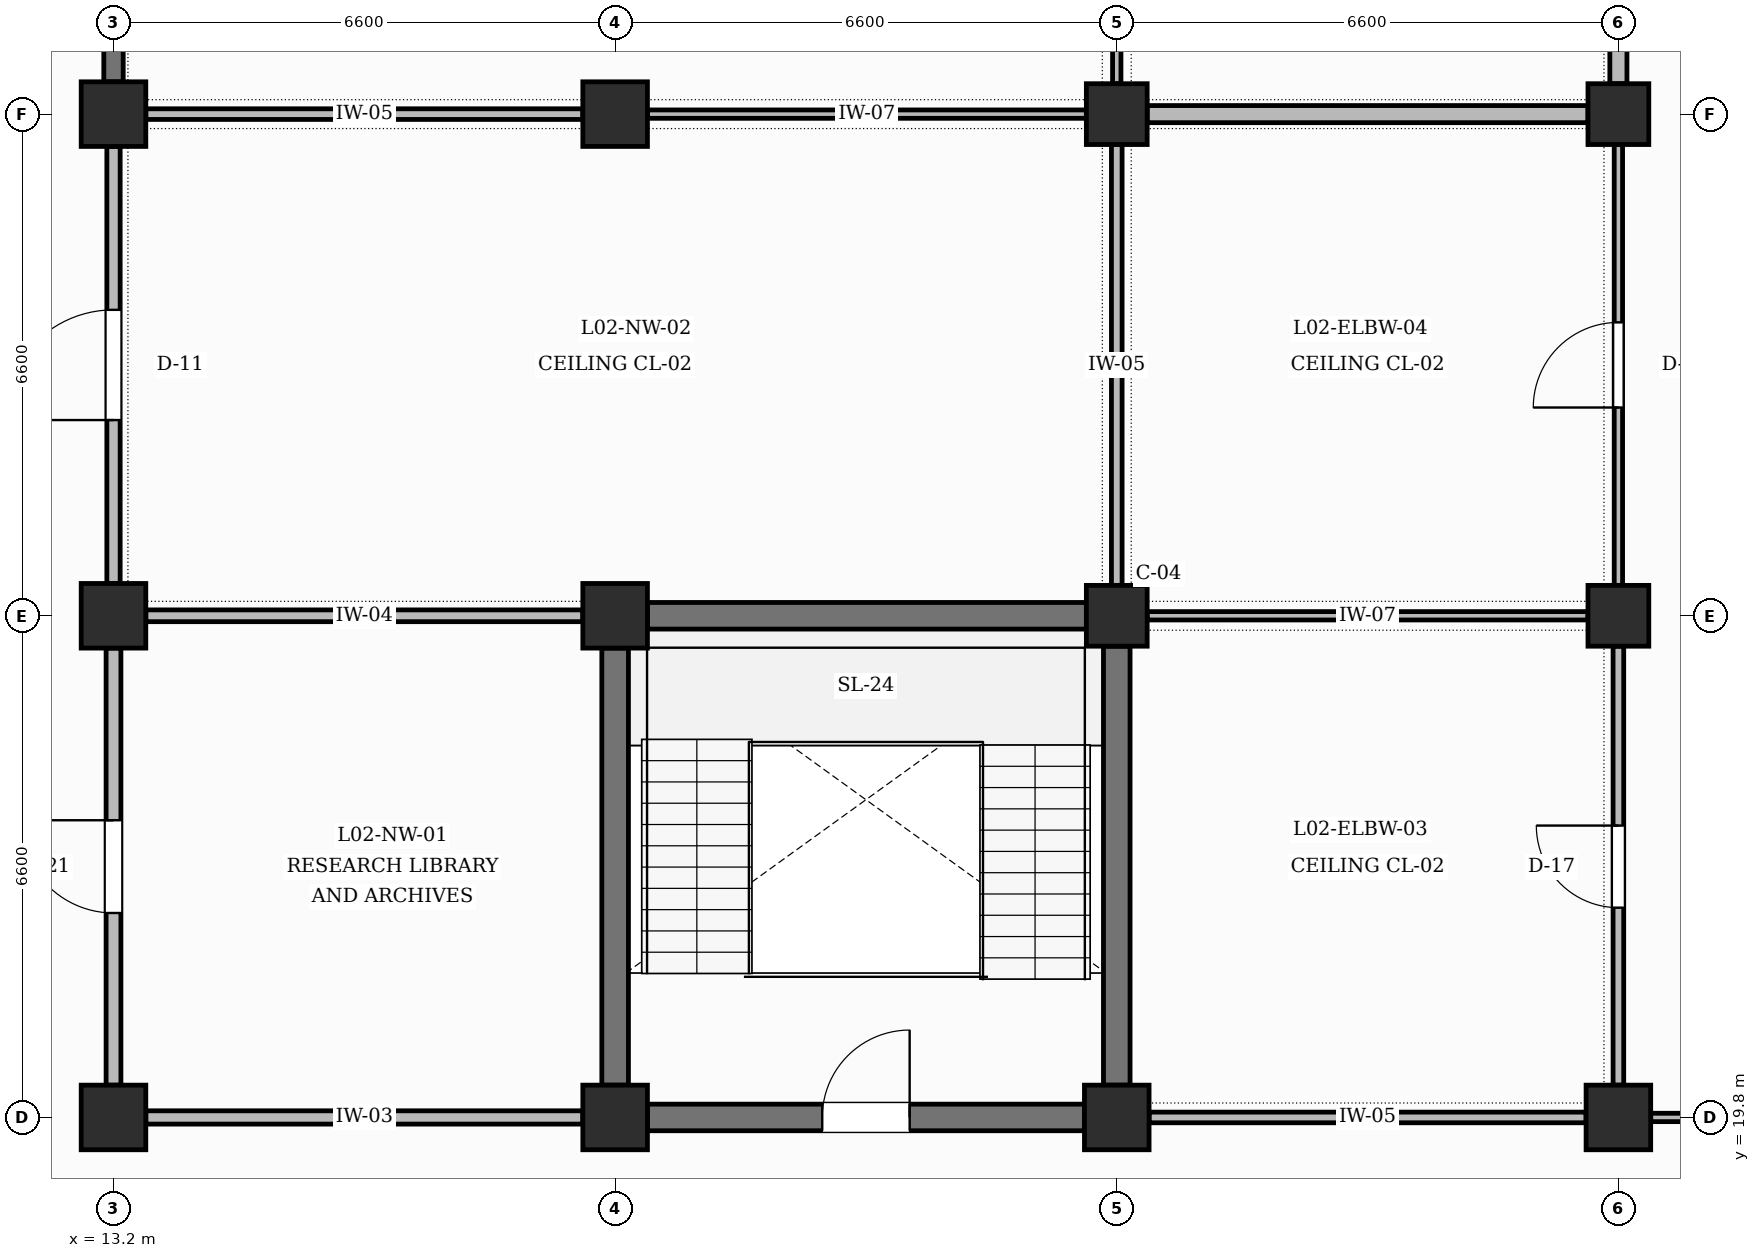
"""IFC4 building model, lengths in metres.
Left out: names, types, materials, properties, quantities, classifications, styles, units other than length and angle.
Written with IfcOpenShell. Run it as: python <this file> out.ifc"""

import sys

from ifc_helpers import new_model, si_unit, direction, frame, frame_2d, origin, origin_2d, place, context, subcontext, project, spatial, rectangle, extrude, element, fill, save


model = new_model("IFC4")
c1 = context("Model", 3, precision=1e-05, world=origin(), true_north=direction((0.0, 1.0)))
c2 = subcontext(c1, "Body", "Model", "MODEL_VIEW")
j1 = project(units=[si_unit("LENGTHUNIT", "METRE"), si_unit("PLANEANGLEUNIT", "RADIAN")], contexts=[c1])
p1 = place(None, origin())
s1 = spatial("IfcSite", under=j1, at=p1, CompositionType="ELEMENT")
p2 = place(p1, origin())
s2 = spatial("IfcBuilding", under=s1, at=p2, CompositionType="ELEMENT")
p3 = place(p2, frame((0.0, 0.0, 10.2)))
s3 = spatial("IfcBuildingStorey", under=s2, at=p3, CompositionType="ELEMENT", Elevation=10.2)
for number, where, z_axis, x_axis in (
    (1, (13.2, 19.8, 0.0), (0.0, 0.0, 1.0), (1.0, 0.0, 0.0)),
    (2, (13.2, 26.4, 0.0), (0.0, 0.0, 1.0), (1.0, 0.0, 0.0)),
    (3, (13.2, 33.0, 0.0), (0.0, 0.0, 1.0), (1.0, 0.0, 0.0)),
    (4, (19.8, 19.8, 0.0), (0.0, 0.0, 1.0), (1.0, 0.0, 0.0)),
    (5, (19.8, 26.4, 0.0), (0.0, 0.0, 1.0), (1.0, 0.0, 0.0)),
    (6, (19.8, 33.0, 0.0), (0.0, 0.0, 1.0), (1.0, 0.0, 0.0)),
    (7, (26.4, 19.8, 0.0), (0.0, 0.0, 1.0), (1.0, 0.0, 0.0)),
):
    element("IfcColumn", number, at=place(p3, frame(where, z_axis=z_axis, x_axis=x_axis)), inside=s3, PredefinedType="COLUMN", context=c2, shape_type="SweptSolid", body=[
        extrude(rectangle(XDim=0.85, YDim=0.85, at=origin_2d()), origin(), (0.0, 0.0, 1.0), 4.2),
    ])
for number, where, z_axis, x_axis in (
    (8, (26.4, 26.4, 0.0), (0.0, 0.0, 1.0), (1.0, 0.0, 0.0)),
    (9, (26.4, 33.0, 0.0), (0.0, 0.0, 1.0), (1.0, 0.0, 0.0)),
):
    element("IfcColumn", number, at=place(p3, frame(where, z_axis=z_axis, x_axis=x_axis)), inside=s3, PredefinedType="COLUMN", context=c2, shape_type="SweptSolid", body=[
        extrude(rectangle(XDim=0.8, YDim=0.8, at=origin_2d()), origin(), (0.0, 0.0, 1.0), 4.2),
    ])
p4 = place(p3, frame((33.0, 19.8, 0.0), z_axis=(0.0, 0.0, 1.0), x_axis=(1.0, 0.0, 0.0)))
e10 = element("IfcColumn", 10, at=p4, inside=s3, PredefinedType="COLUMN", context=c2, shape_type="SweptSolid", body=[
    extrude(rectangle(XDim=0.85, YDim=0.85, at=origin_2d()), origin(), (0.0, 0.0, 1.0), 4.2),
])
for number, where, z_axis, x_axis in (
    (11, (33.0, 26.4, 0.0), (0.0, 0.0, 1.0), (1.0, 0.0, 0.0)),
    (12, (33.0, 33.0, 0.0), (0.0, 0.0, 1.0), (1.0, 0.0, 0.0)),
):
    element("IfcColumn", number, at=place(p3, frame(where, z_axis=z_axis, x_axis=x_axis)), inside=s3, PredefinedType="COLUMN", context=c2, shape_type="SweptSolid", body=[
        extrude(rectangle(XDim=0.8, YDim=0.8, at=origin_2d()), origin(), (0.0, 0.0, 1.0), 4.2),
    ])
p5 = place(p3, frame((20.225, 19.8, 0.0), z_axis=(0.0, 0.0, 1.0), x_axis=(1.0, 0.0, 0.0)))
e13 = element("IfcWall", 13, at=p5, inside=s3, PredefinedType="SHEAR", context=c2, shape_type="SweptSolid", body=[
    extrude(rectangle(XDim=5.75, YDim=0.35, at=frame_2d((2.875, 0.0))), origin(), (0.0, 0.0, 1.0), 3.0),
])
p6 = place(p5, frame((2.3, 0.0, 0.0)))
e14 = element("IfcOpeningElement", 14, at=p6, cuts=e13, PredefinedType="OPENING", context=c2, shape_type="SweptSolid", body=[
    extrude(rectangle(XDim=1.15, YDim=2.2, at=frame_2d((0.575, 1.1))), frame((0.0, 0.185, 0.0), z_axis=(0.0, -1.0, 0.0), x_axis=(1.0, 0.0, 0.0)), (0.0, 0.0, 1.0), 0.37),
])
p7 = place(p3, frame((20.225, 26.4, 0.0), z_axis=(0.0, 0.0, 1.0), x_axis=(1.0, 0.0, 0.0)))
e15 = element("IfcWall", 15, at=p7, inside=s3, PredefinedType="SHEAR", context=c2, shape_type="SweptSolid", body=[
    extrude(rectangle(XDim=5.775, YDim=0.35, at=frame_2d((2.887, 0.0))), origin(), (0.0, 0.0, 1.0), 3.1),
])
p8 = place(p3, frame((19.8, 20.225, 0.0), z_axis=(0.0, 0.0, 1.0), x_axis=(0.0, 1.0, 0.0)))
e16 = element("IfcWall", 16, at=p8, inside=s3, PredefinedType="SHEAR", context=c2, shape_type="SweptSolid", body=[
    extrude(rectangle(XDim=5.75, YDim=0.35, at=frame_2d((2.875, 0.0))), origin(), (0.0, 0.0, 1.0), 3.1),
])
p9 = place(p3, frame((26.4, 20.225, 0.0), z_axis=(0.0, 0.0, 1.0), x_axis=(0.0, 1.0, 0.0)))
e17 = element("IfcWall", 17, at=p9, inside=s3, PredefinedType="SHEAR", context=c2, shape_type="SweptSolid", body=[
    extrude(rectangle(XDim=5.775, YDim=0.35, at=frame_2d((2.887, 0.0))), origin(), (0.0, 0.0, 1.0), 3.1),
])
p10 = place(p3, frame((13.2, 20.225, 0.0), z_axis=(0.0, 0.0, 1.0), x_axis=(0.0, 1.0, 0.0)))
e18 = element("IfcWall", 18, at=p10, inside=s3, PredefinedType="PARTITIONING", context=c2, shape_type="SweptSolid", body=[
    extrude(rectangle(XDim=5.75, YDim=0.195, at=frame_2d((2.875, 0.0))), origin(), (0.0, 0.0, 1.0), 3.1),
])
p11 = place(p10, frame((2.265, 0.0, 0.0)))
e19 = element("IfcOpeningElement", 19, at=p11, cuts=e18, PredefinedType="OPENING", context=c2, shape_type="SweptSolid", body=[
    extrude(rectangle(XDim=1.22, YDim=2.15, at=frame_2d((0.61, 1.075))), frame((0.0, 0.107, 0.0), z_axis=(0.0, -1.0, 0.0), x_axis=(1.0, 0.0, 0.0)), (0.0, 0.0, 1.0), 0.215),
])
p12 = place(p3, frame((13.2, 26.825, 0.0), z_axis=(0.0, 0.0, 1.0), x_axis=(0.0, 1.0, 0.0)))
e20 = element("IfcWall", 20, at=p12, inside=s3, PredefinedType="PARTITIONING", context=c2, shape_type="SweptSolid", body=[
    extrude(rectangle(XDim=5.75, YDim=0.175, at=frame_2d((2.875, 0.0))), origin(), (0.0, 0.0, 1.0), 3.1),
])
p13 = place(p12, frame((2.15, 0.0, 0.0)))
e21 = element("IfcOpeningElement", 21, at=p13, cuts=e20, PredefinedType="OPENING", context=c2, shape_type="SweptSolid", body=[
    extrude(rectangle(XDim=1.45, YDim=2.25, at=frame_2d((0.725, 1.125))), frame((0.0, 0.097, 0.0), z_axis=(0.0, -1.0, 0.0), x_axis=(1.0, 0.0, 0.0)), (0.0, 0.0, 1.0), 0.195),
])
p14 = place(p3, frame((13.2, 33.425, 0.0), z_axis=(0.0, 0.0, 1.0), x_axis=(0.0, 1.0, 0.0)))
e22 = element("IfcWall", 22, at=p14, inside=s3, PredefinedType="SHEAR", context=c2, shape_type="SweptSolid", body=[
    extrude(rectangle(XDim=5.75, YDim=0.255, at=frame_2d((2.875, 0.0))), origin(), (0.0, 0.0, 1.0), 3.1),
])
p15 = place(p14, frame((2.335, 0.0, 0.0)))
e23 = element("IfcOpeningElement", 23, at=p15, cuts=e22, PredefinedType="OPENING", context=c2, shape_type="SweptSolid", body=[
    extrude(rectangle(XDim=1.08, YDim=2.15, at=frame_2d((0.54, 1.075))), frame((0.0, 0.137, 0.0), z_axis=(0.0, -1.0, 0.0), x_axis=(1.0, 0.0, 0.0)), (0.0, 0.0, 1.0), 0.275),
])
p16 = place(p3, frame((13.625, 19.8, 0.0), z_axis=(0.0, 0.0, 1.0), x_axis=(1.0, 0.0, 0.0)))
e24 = element("IfcWall", 24, at=p16, inside=s3, PredefinedType="PARTITIONING", context=c2, shape_type="SweptSolid", body=[
    extrude(rectangle(XDim=5.75, YDim=0.175, at=frame_2d((2.875, 0.0))), origin(), (0.0, 0.0, 1.0), 3.1),
])
p17 = place(p3, frame((13.625, 26.4, 0.0), z_axis=(0.0, 0.0, 1.0), x_axis=(1.0, 0.0, 0.0)))
e25 = element("IfcWall", 25, at=p17, inside=s3, PredefinedType="PARTITIONING", context=c2, shape_type="SweptSolid", body=[
    extrude(rectangle(XDim=5.75, YDim=0.155, at=frame_2d((2.875, 0.0))), origin(), (0.0, 0.0, 1.0), 3.0),
])
p18 = place(p3, frame((13.625, 33.0, 0.0), z_axis=(0.0, 0.0, 1.0), x_axis=(1.0, 0.0, 0.0)))
e26 = element("IfcWall", 26, at=p18, inside=s3, PredefinedType="PARTITIONING", context=c2, shape_type="SweptSolid", body=[
    extrude(rectangle(XDim=5.75, YDim=0.14, at=frame_2d((2.875, 0.0))), origin(), (0.0, 0.0, 1.0), 3.1),
])
p19 = place(p3, frame((26.4, 26.8, 0.0), z_axis=(0.0, 0.0, 1.0), x_axis=(0.0, 1.0, 0.0)))
e27 = element("IfcWall", 27, at=p19, inside=s3, PredefinedType="PARTITIONING", context=c2, shape_type="SweptSolid", body=[
    extrude(rectangle(XDim=5.8, YDim=0.14, at=frame_2d((2.9, 0.0))), origin(), (0.0, 0.0, 1.0), 3.1),
])
p20 = place(p3, frame((20.225, 33.0, 0.0), z_axis=(0.0, 0.0, 1.0), x_axis=(1.0, 0.0, 0.0)))
e28 = element("IfcWall", 28, at=p20, inside=s3, PredefinedType="PARTITIONING", context=c2, shape_type="SweptSolid", body=[
    extrude(rectangle(XDim=5.775, YDim=0.11, at=frame_2d((2.887, 0.0))), origin(), (0.0, 0.0, 1.0), 3.0),
])
p21 = place(p3, frame((26.4, 33.4, 0.0), z_axis=(0.0, 0.0, 1.0), x_axis=(0.0, 1.0, 0.0)))
e29 = element("IfcWall", 29, at=p21, inside=s3, PredefinedType="PARTITIONING", context=c2, shape_type="SweptSolid", body=[
    extrude(rectangle(XDim=5.8, YDim=0.11, at=frame_2d((2.9, 0.0))), origin(), (0.0, 0.0, 1.0), 3.1),
])
p22 = place(p3, frame((26.825, 19.8, 0.0), z_axis=(0.0, 0.0, 1.0), x_axis=(1.0, 0.0, 0.0)))
e30 = element("IfcWall", 30, at=p22, inside=s3, PredefinedType="PARTITIONING", context=c2, shape_type="SweptSolid", body=[
    extrude(rectangle(XDim=5.75, YDim=0.14, at=frame_2d((2.875, 0.0))), origin(), (0.0, 0.0, 1.0), 3.1),
])
p23 = place(p3, frame((33.0, 20.225, 0.0), z_axis=(0.0, 0.0, 1.0), x_axis=(0.0, 1.0, 0.0)))
e31 = element("IfcWall", 31, at=p23, inside=s3, PredefinedType="PARTITIONING", context=c2, shape_type="SweptSolid", body=[
    extrude(rectangle(XDim=5.775, YDim=0.14, at=frame_2d((2.887, 0.0))), origin(), (0.0, 0.0, 1.0), 3.1),
])
p24 = place(p23, frame((2.335, 0.0, 0.0)))
e32 = element("IfcOpeningElement", 32, at=p24, cuts=e31, PredefinedType="OPENING", context=c2, shape_type="SweptSolid", body=[
    extrude(rectangle(XDim=1.08, YDim=2.15, at=frame_2d((0.54, 1.075))), frame((0.0, 0.08, 0.0), z_axis=(0.0, -1.0, 0.0), x_axis=(1.0, 0.0, 0.0)), (0.0, 0.0, 1.0), 0.16),
])
p25 = place(p3, frame((26.8, 26.4, 0.0), z_axis=(0.0, 0.0, 1.0), x_axis=(1.0, 0.0, 0.0)))
e33 = element("IfcWall", 33, at=p25, inside=s3, PredefinedType="PARTITIONING", context=c2, shape_type="SweptSolid", body=[
    extrude(rectangle(XDim=5.8, YDim=0.11, at=frame_2d((2.9, 0.0))), origin(), (0.0, 0.0, 1.0), 3.0),
])
p26 = place(p3, frame((33.0, 26.8, 0.0), z_axis=(0.0, 0.0, 1.0), x_axis=(0.0, 1.0, 0.0)))
e34 = element("IfcWall", 34, at=p26, inside=s3, PredefinedType="PARTITIONING", context=c2, shape_type="SweptSolid", body=[
    extrude(rectangle(XDim=5.8, YDim=0.11, at=frame_2d((2.9, 0.0))), origin(), (0.0, 0.0, 1.0), 3.1),
])
p27 = place(p26, frame((2.34, 0.0, 0.0)))
e35 = element("IfcOpeningElement", 35, at=p27, cuts=e34, PredefinedType="OPENING", context=c2, shape_type="SweptSolid", body=[
    extrude(rectangle(XDim=1.12, YDim=2.2, at=frame_2d((0.56, 1.1))), frame((0.0, 0.065, 0.0), z_axis=(0.0, -1.0, 0.0), x_axis=(1.0, 0.0, 0.0)), (0.0, 0.0, 1.0), 0.13),
])
p28 = place(p3, frame((26.8, 33.0, 0.0), z_axis=(0.0, 0.0, 1.0), x_axis=(1.0, 0.0, 0.0)))
e36 = element("IfcWall", 36, at=p28, inside=s3, PredefinedType="PARTITIONING", context=c2, shape_type="SweptSolid", body=[
    extrude(rectangle(XDim=5.8, YDim=0.225, at=frame_2d((2.9, 0.0))), origin(), (0.0, 0.0, 1.0), 3.1),
])
p29 = place(p3, frame((33.0, 33.4, 0.0), z_axis=(0.0, 0.0, 1.0), x_axis=(0.0, 1.0, 0.0)))
e37 = element("IfcWall", 37, at=p29, inside=s3, PredefinedType="PARTITIONING", context=c2, shape_type="SweptSolid", body=[
    extrude(rectangle(XDim=5.8, YDim=0.225, at=frame_2d((2.9, 0.0))), origin(), (0.0, 0.0, 1.0), 3.1),
])
p30 = place(p29, frame((2.31, 0.0, 0.0)))
e38 = element("IfcOpeningElement", 38, at=p30, cuts=e37, PredefinedType="OPENING", context=c2, shape_type="SweptSolid", body=[
    extrude(rectangle(XDim=1.18, YDim=2.2, at=frame_2d((0.59, 1.1))), frame((0.0, 0.123, 0.0), z_axis=(0.0, -1.0, 0.0), x_axis=(1.0, 0.0, 0.0)), (0.0, 0.0, 1.0), 0.245),
])
p31 = place(p3, frame((33.425, 19.8, 0.0), z_axis=(0.0, 0.0, 1.0), x_axis=(1.0, 0.0, 0.0)))
e39 = element("IfcWall", 39, at=p31, inside=s3, PredefinedType="PARTITIONING", context=c2, shape_type="SweptSolid", body=[
    extrude(rectangle(XDim=5.775, YDim=0.11, at=frame_2d((2.887, 0.0))), origin(), (0.0, 0.0, 1.0), 3.0),
])
p32 = place(p31, frame((1.975, 0.0, 0.0)))
e40 = element("IfcOpeningElement", 40, at=p32, cuts=e39, PredefinedType="OPENING", context=c2, shape_type="SweptSolid", body=[
    extrude(rectangle(XDim=1.8, YDim=2.3, at=frame_2d((0.9, 1.15))), frame((0.0, 0.065, 0.0), z_axis=(0.0, -1.0, 0.0), x_axis=(1.0, 0.0, 0.0)), (0.0, 0.0, 1.0), 0.13),
])
p33 = place(p6, origin())
e41 = element("IfcDoor", 41, at=p33, inside=s3, OperationType="SINGLE_SWING_RIGHT", PredefinedType="DOOR", context=c2, shape_type="SweptSolid", body=[
    extrude(rectangle(XDim=1.15, YDim=2.2, at=frame_2d((0.575, 1.1))), frame((0.0, 0.025, 0.0), z_axis=(0.0, -1.0, 0.0), x_axis=(1.0, 0.0, 0.0)), (0.0, 0.0, 1.0), 0.05),
])
fill(e14, e41)
p34 = place(p24, origin())
e42 = element("IfcDoor", 42, at=p34, inside=s3, OperationType="SINGLE_SWING_RIGHT", PredefinedType="DOOR", context=c2, shape_type="SweptSolid", body=[
    extrude(rectangle(XDim=1.08, YDim=2.15, at=frame_2d((0.54, 1.075))), frame((0.0, 0.025, 0.0), z_axis=(0.0, -1.0, 0.0), x_axis=(1.0, 0.0, 0.0)), (0.0, 0.0, 1.0), 0.05),
])
fill(e32, e42)
p35 = place(p27, origin())
e43 = element("IfcDoor", 43, at=p35, inside=s3, OperationType="SINGLE_SWING_LEFT", PredefinedType="DOOR", context=c2, shape_type="SweptSolid", body=[
    extrude(rectangle(XDim=1.12, YDim=2.2, at=frame_2d((0.56, 1.1))), frame((0.0, 0.025, 0.0), z_axis=(0.0, -1.0, 0.0), x_axis=(1.0, 0.0, 0.0)), (0.0, 0.0, 1.0), 0.05),
])
fill(e35, e43)
p36 = place(p11, origin())
e44 = element("IfcDoor", 44, at=p36, inside=s3, OperationType="SINGLE_SWING_RIGHT", PredefinedType="DOOR", context=c2, shape_type="SweptSolid", body=[
    extrude(rectangle(XDim=1.22, YDim=2.15, at=frame_2d((0.61, 1.075))), frame((0.0, 0.025, 0.0), z_axis=(0.0, -1.0, 0.0), x_axis=(1.0, 0.0, 0.0)), (0.0, 0.0, 1.0), 0.05),
])
fill(e19, e44)
p37 = place(p13, origin())
e45 = element("IfcDoor", 45, at=p37, inside=s3, OperationType="SINGLE_SWING_LEFT", PredefinedType="DOOR", context=c2, shape_type="SweptSolid", body=[
    extrude(rectangle(XDim=1.45, YDim=2.25, at=frame_2d((0.725, 1.125))), frame((0.0, 0.025, 0.0), z_axis=(0.0, -1.0, 0.0), x_axis=(1.0, 0.0, 0.0)), (0.0, 0.0, 1.0), 0.05),
])
fill(e21, e45)
save(model, sys.argv[1])
